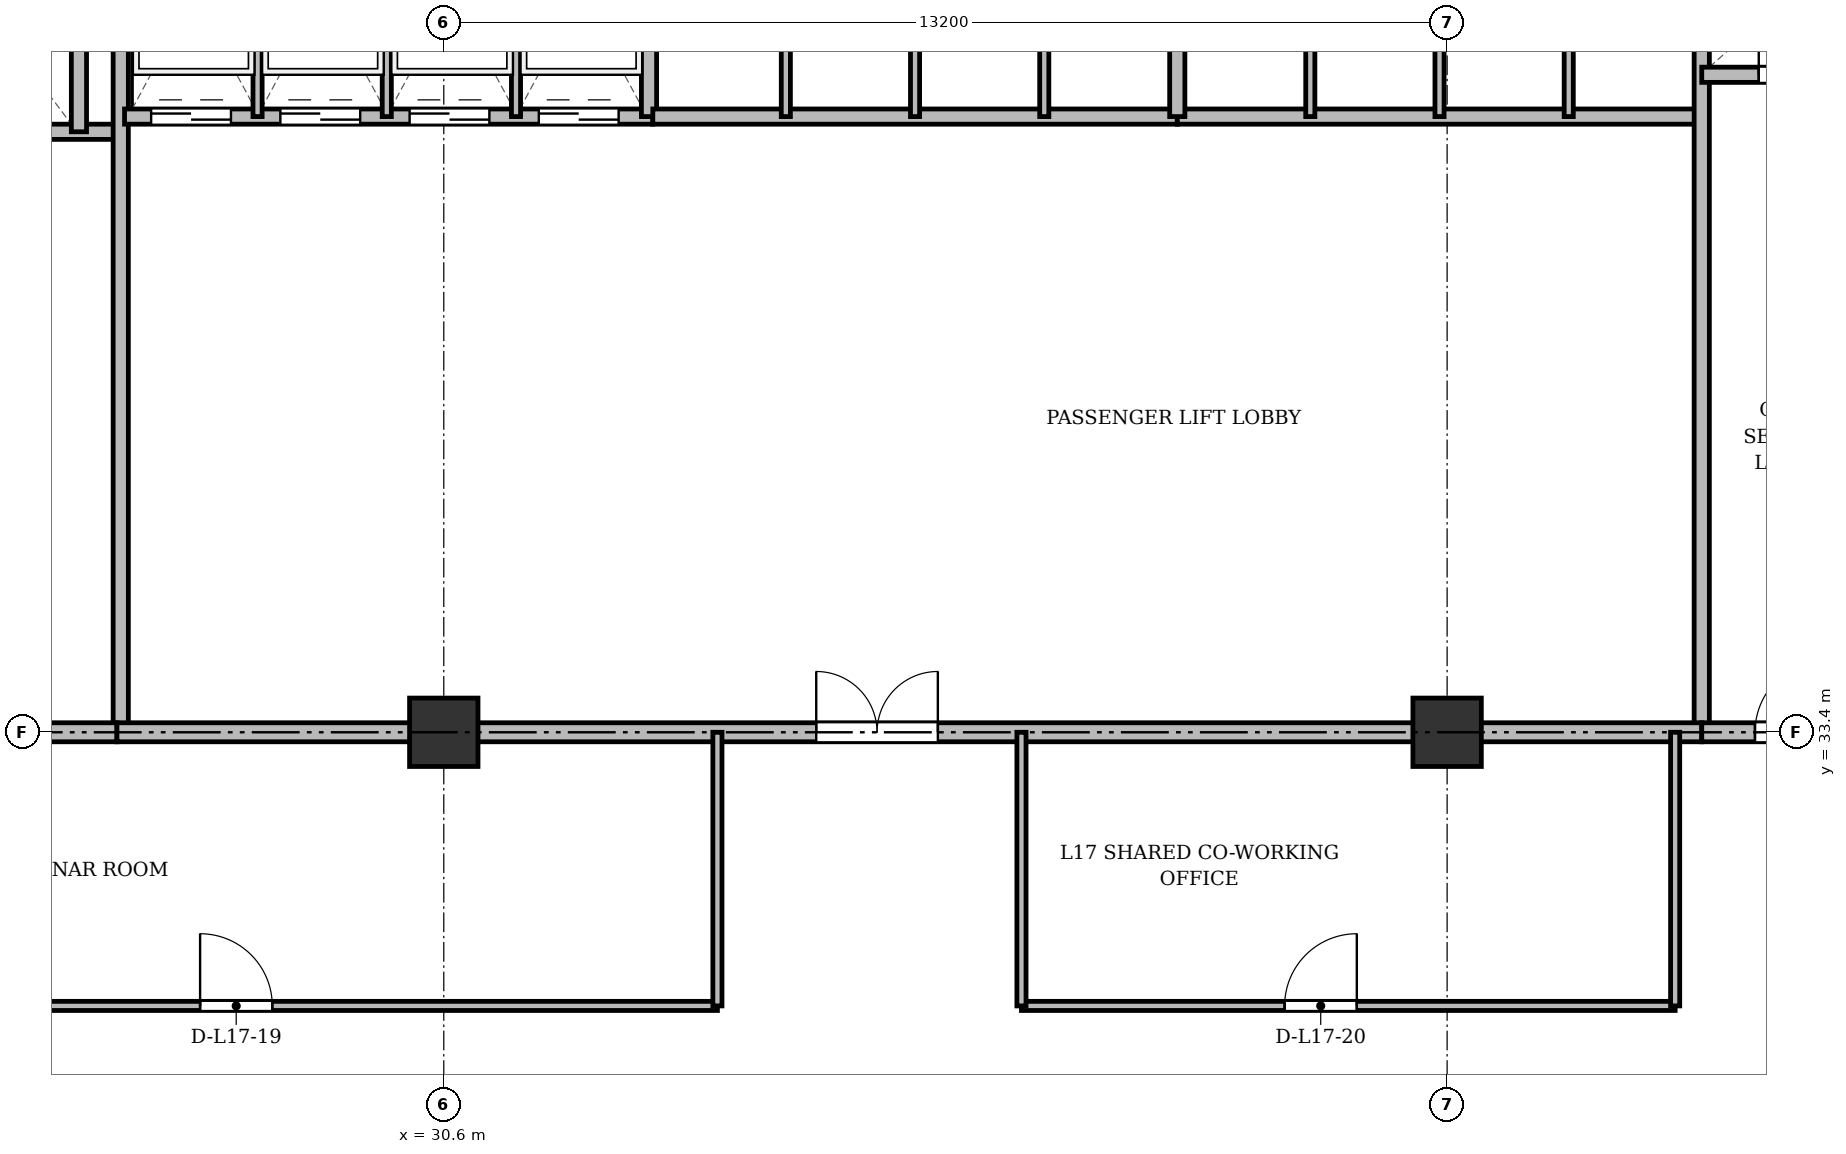
"""IFC4 building model, lengths in metres.
Left out: names, types, materials, properties, quantities, classifications, styles, units other than length and angle.
Written with IfcOpenShell. Run it as: python <this file> out.ifc"""

import sys

from ifc_helpers import new_model, si_unit, direction, frame, frame_2d, origin, origin_2d, place, context, subcontext, project, spatial, rectangle, extrude, source, transform, mapped, element, fill, save


model = new_model("IFC4")
c1 = context("Model", 3, precision=1e-05, world=origin(), true_north=direction((0.0, 1.0)))
c2 = subcontext(c1, "Body", "Model", "MODEL_VIEW")
j1 = project(units=[si_unit("LENGTHUNIT", "METRE"), si_unit("PLANEANGLEUNIT", "RADIAN")], contexts=[c1])
p1 = place(None, origin())
s1 = spatial("IfcSite", under=j1, at=p1, CompositionType="ELEMENT")
p2 = place(p1, origin())
s2 = spatial("IfcBuilding", under=s1, at=p2, CompositionType="ELEMENT")
p3 = place(p2, frame((0.0, 0.0, 66.7)))
s3 = spatial("IfcBuildingStorey", under=s2, at=p3, CompositionType="ELEMENT", Elevation=66.7)
m1 = source(origin(), c2, "Body", "SweptSolid", [
    extrude(rectangle(XDim=0.9, YDim=0.9, at=origin_2d()), origin(), (0.0, 0.0, 1.0), 3.6),
])
for number, where, z_axis, x_axis in (
    (1, (30.6, 33.4, 0.0), (0.0, 0.0, 1.0), (1.0, 0.0, 0.0)),
    (2, (43.8, 33.4, 0.0), (0.0, 0.0, 1.0), (1.0, 0.0, 0.0)),
):
    element("IfcColumn", number, at=place(p3, frame(where, z_axis=z_axis, x_axis=x_axis)), inside=s3, PredefinedType="COLUMN", context=c2, shape_type="MappedRepresentation", body=[
        mapped(m1, transform((0.0, 0.0, 0.0), x_axis=(1.0, 0.0, 0.0), y_axis=(0.0, 1.0, 0.0), z_axis=(0.0, 0.0, 1.0), scale=1.0)),
    ])
p4 = place(p3, frame((19.55, 41.3, 0.0), z_axis=(0.0, 0.0, 1.0), x_axis=(1.0, 0.0, 0.0)))
e3 = element("IfcWall", 3, at=p4, inside=s3, PredefinedType="SOLIDWALL", context=c2, shape_type="SweptSolid", body=[
    extrude(rectangle(XDim=6.75, YDim=0.2, at=frame_2d((3.375, 0.0))), origin(), (0.0, 0.0, 1.0), 3.34),
])
p5 = place(p4, frame((1.7, 0.0, 0.0)))
e4 = element("IfcOpeningElement", 4, at=p5, cuts=e3, PredefinedType="OPENING", context=c2, shape_type="SweptSolid", body=[
    extrude(rectangle(XDim=1.1, YDim=2.15, at=frame_2d((0.55, 1.075))), frame((0.0, 0.11, 0.0), z_axis=(0.0, -1.0, 0.0), x_axis=(1.0, 0.0, 0.0)), (0.0, 0.0, 1.0), 0.22),
])
p6 = place(p4, frame((4.4, 0.0, 0.0)))
e5 = element("IfcOpeningElement", 5, at=p6, cuts=e3, PredefinedType="OPENING", context=c2, shape_type="SweptSolid", body=[
    extrude(rectangle(XDim=1.1, YDim=2.15, at=frame_2d((0.55, 1.075))), frame((0.0, 0.11, 0.0), z_axis=(0.0, -1.0, 0.0), x_axis=(1.0, 0.0, 0.0)), (0.0, 0.0, 1.0), 0.22),
])
p7 = place(p3, frame((25.8, 41.3, 0.0), z_axis=(0.0, 0.0, 1.0), x_axis=(0.0, 1.0, 0.0)))
e6 = element("IfcWall", 6, at=p7, inside=s3, PredefinedType="SOLIDWALL", context=c2, shape_type="SweptSolid", body=[
    extrude(rectangle(XDim=3.4, YDim=0.2, at=frame_2d((1.7, 0.0))), origin(), (0.0, 0.0, 1.0), 3.34),
])
p8 = place(p3, frame((26.35, 33.4, 0.0), z_axis=(0.0, 0.0, 1.0), x_axis=(0.0, 1.0, 0.0)))
e7 = element("IfcWall", 7, at=p8, inside=s3, PredefinedType="SOLIDWALL", context=c2, shape_type="SweptSolid", body=[
    extrude(rectangle(XDim=11.3, YDim=0.2, at=frame_2d((5.65, 0.0))), origin(), (0.0, 0.0, 1.0), 2.69),
])
p9 = place(p3, frame((19.5, 33.4, 0.0), z_axis=(0.0, 0.0, 1.0), x_axis=(1.0, 0.0, 0.0)))
e8 = element("IfcWall", 8, at=p9, inside=s3, PredefinedType="PARTITIONING", context=c2, shape_type="SweptSolid", body=[
    extrude(rectangle(XDim=6.8, YDim=0.25, at=frame_2d((3.4, 0.0))), origin(), (0.0, 0.0, 1.0), 2.69),
])
p10 = place(p9, frame((0.75, 0.0, 0.0)))
e9 = element("IfcOpeningElement", 9, at=p10, cuts=e8, PredefinedType="OPENING", context=c2, shape_type="SweptSolid", body=[
    extrude(rectangle(XDim=1.6, YDim=2.2, at=frame_2d((0.8, 1.1))), frame((0.0, 0.135, 0.0), z_axis=(0.0, -1.0, 0.0), x_axis=(1.0, 0.0, 0.0)), (0.0, 0.0, 1.0), 0.27),
])
p11 = place(p3, frame((26.4, 41.5, 0.0), z_axis=(0.0, 0.0, 1.0), x_axis=(1.0, 0.0, 0.0)))
e10 = element("IfcWall", 10, at=p11, inside=s3, PredefinedType="SOLIDWALL", context=c2, shape_type="SweptSolid", body=[
    extrude(rectangle(XDim=6.95, YDim=0.2, at=frame_2d((3.475, 0.0))), origin(), (0.0, 0.0, 1.0), 3.34),
])
p12 = place(p11, frame((0.35, 0.0, 0.0)))
e11 = element("IfcOpeningElement", 11, at=p12, cuts=e10, PredefinedType="OPENING", context=c2, shape_type="SweptSolid", body=[
    extrude(rectangle(XDim=1.05, YDim=2.15, at=frame_2d((0.525, 1.075))), frame((0.0, 0.11, 0.0), z_axis=(0.0, -1.0, 0.0), x_axis=(1.0, 0.0, 0.0)), (0.0, 0.0, 1.0), 0.22),
])
p13 = place(p11, frame((2.05, 0.0, 0.0)))
e12 = element("IfcOpeningElement", 12, at=p13, cuts=e10, PredefinedType="OPENING", context=c2, shape_type="SweptSolid", body=[
    extrude(rectangle(XDim=1.05, YDim=2.15, at=frame_2d((0.525, 1.075))), frame((0.0, 0.11, 0.0), z_axis=(0.0, -1.0, 0.0), x_axis=(1.0, 0.0, 0.0)), (0.0, 0.0, 1.0), 0.22),
])
p14 = place(p11, frame((3.75, 0.0, 0.0)))
e13 = element("IfcOpeningElement", 13, at=p14, cuts=e10, PredefinedType="OPENING", context=c2, shape_type="SweptSolid", body=[
    extrude(rectangle(XDim=1.05, YDim=2.15, at=frame_2d((0.525, 1.075))), frame((0.0, 0.11, 0.0), z_axis=(0.0, -1.0, 0.0), x_axis=(1.0, 0.0, 0.0)), (0.0, 0.0, 1.0), 0.22),
])
p15 = place(p11, frame((5.45, 0.0, 0.0)))
e14 = element("IfcOpeningElement", 14, at=p15, cuts=e10, PredefinedType="OPENING", context=c2, shape_type="SweptSolid", body=[
    extrude(rectangle(XDim=1.05, YDim=2.15, at=frame_2d((0.525, 1.075))), frame((0.0, 0.11, 0.0), z_axis=(0.0, -1.0, 0.0), x_axis=(1.0, 0.0, 0.0)), (0.0, 0.0, 1.0), 0.22),
])
p16 = place(p3, frame((33.3, 41.5, 0.0), z_axis=(0.0, 0.0, 1.0), x_axis=(0.0, 1.0, 0.0)))
e15 = element("IfcWall", 15, at=p16, inside=s3, PredefinedType="SOLIDWALL", context=c2, shape_type="SweptSolid", body=[
    extrude(rectangle(XDim=3.2, YDim=0.2, at=frame_2d((1.6, 0.0))), origin(), (0.0, 0.0, 1.0), 3.34),
])
for number, where, z_axis, x_axis in (
    (16, (28.15, 41.5, 0.0), (0.0, 0.0, 1.0), (0.0, 1.0, 0.0)),
    (17, (29.85, 41.5, 0.0), (0.0, 0.0, 1.0), (0.0, 1.0, 0.0)),
    (18, (31.55, 41.5, 0.0), (0.0, 0.0, 1.0), (0.0, 1.0, 0.0)),
):
    element("IfcWall", number, at=place(p3, frame(where, z_axis=z_axis, x_axis=x_axis)), inside=s3, PredefinedType="PARTITIONING", context=c2, shape_type="SweptSolid", body=[
        extrude(rectangle(XDim=3.2, YDim=0.12, at=frame_2d((1.6, 0.0))), origin(), (0.0, 0.0, 1.0), 3.34),
    ])
p17 = place(p3, frame((33.35, 41.5, 0.0), z_axis=(0.0, 0.0, 1.0), x_axis=(1.0, 0.0, 0.0)))
e19 = element("IfcWall", 19, at=p17, inside=s3, PredefinedType="SOLIDWALL", context=c2, shape_type="SweptSolid", body=[
    extrude(rectangle(XDim=6.9, YDim=0.2, at=frame_2d((3.45, 0.0))), origin(), (0.0, 0.0, 1.0), 3.34),
])
for number, where, z_axis, x_axis in (
    (20, (35.1, 41.5, 0.0), (0.0, 0.0, 1.0), (0.0, 1.0, 0.0)),
    (21, (36.8, 41.5, 0.0), (0.0, 0.0, 1.0), (0.0, 1.0, 0.0)),
    (22, (38.5, 41.5, 0.0), (0.0, 0.0, 1.0), (0.0, 1.0, 0.0)),
):
    element("IfcWall", number, at=place(p3, frame(where, z_axis=z_axis, x_axis=x_axis)), inside=s3, PredefinedType="PARTITIONING", context=c2, shape_type="SweptSolid", body=[
        extrude(rectangle(XDim=3.2, YDim=0.12, at=frame_2d((1.6, 0.0))), origin(), (0.0, 0.0, 1.0), 3.34),
    ])
p18 = place(p3, frame((40.25, 41.5, 0.0), z_axis=(0.0, 0.0, 1.0), x_axis=(1.0, 0.0, 0.0)))
e23 = element("IfcWall", 23, at=p18, inside=s3, PredefinedType="SOLIDWALL", context=c2, shape_type="SweptSolid", body=[
    extrude(rectangle(XDim=6.9, YDim=0.2, at=frame_2d((3.45, 0.0))), origin(), (0.0, 0.0, 1.0), 2.752),
])
p19 = place(p3, frame((40.25, 41.5, 0.0), z_axis=(0.0, 0.0, 1.0), x_axis=(0.0, 1.0, 0.0)))
e24 = element("IfcWall", 24, at=p19, inside=s3, PredefinedType="SOLIDWALL", context=c2, shape_type="SweptSolid", body=[
    extrude(rectangle(XDim=3.2, YDim=0.2, at=frame_2d((1.6, 0.0))), origin(), (0.0, 0.0, 1.0), 3.34),
])
p20 = place(p3, frame((42.0, 41.5, 0.0), z_axis=(0.0, 0.0, 1.0), x_axis=(0.0, 1.0, 0.0)))
e25 = element("IfcWall", 25, at=p20, inside=s3, PredefinedType="PARTITIONING", context=c2, shape_type="SweptSolid", body=[
    extrude(rectangle(XDim=3.2, YDim=0.12, at=frame_2d((1.6, 0.0))), origin(), (0.0, 0.0, 1.0), 3.34),
])
p21 = place(p3, frame((43.7, 41.5, 0.0), z_axis=(0.0, 0.0, 1.0), x_axis=(0.0, 1.0, 0.0)))
e26 = element("IfcWall", 26, at=p21, inside=s3, PredefinedType="PARTITIONING", context=c2, shape_type="SweptSolid", body=[
    extrude(rectangle(XDim=3.2, YDim=0.12, at=frame_2d((1.6, 0.0))), origin(), (0.0, 0.0, 1.0), 2.752),
])
p22 = place(p3, frame((45.4, 41.5, 0.0), z_axis=(0.0, 0.0, 1.0), x_axis=(0.0, 1.0, 0.0)))
e27 = element("IfcWall", 27, at=p22, inside=s3, PredefinedType="PARTITIONING", context=c2, shape_type="SweptSolid", body=[
    extrude(rectangle(XDim=3.2, YDim=0.12, at=frame_2d((1.6, 0.0))), origin(), (0.0, 0.0, 1.0), 3.34),
])
p23 = place(p3, frame((47.15, 33.4, 0.0), z_axis=(0.0, 0.0, 1.0), x_axis=(0.0, 1.0, 0.0)))
e28 = element("IfcWall", 28, at=p23, inside=s3, PredefinedType="SOLIDWALL", context=c2, shape_type="SweptSolid", body=[
    extrude(rectangle(XDim=11.3, YDim=0.2, at=frame_2d((5.65, 0.0))), origin(), (0.0, 0.0, 1.0), 2.69),
])
p24 = place(p3, frame((26.3, 33.4, 0.0), z_axis=(0.0, 0.0, 1.0), x_axis=(1.0, 0.0, 0.0)))
e29 = element("IfcWall", 29, at=p24, inside=s3, PredefinedType="PARTITIONING", context=c2, shape_type="SweptSolid", body=[
    extrude(rectangle(XDim=20.85, YDim=0.25, at=frame_2d((10.425, 0.0))), origin(), (0.0, 0.0, 1.0), 2.69),
])
p25 = place(p24, frame((9.2, 0.0, 0.0)))
e30 = element("IfcOpeningElement", 30, at=p25, cuts=e29, PredefinedType="OPENING", context=c2, shape_type="SweptSolid", body=[
    extrude(rectangle(XDim=1.6, YDim=2.2, at=frame_2d((0.8, 1.1))), frame((0.0, 0.135, 0.0), z_axis=(0.0, -1.0, 0.0), x_axis=(1.0, 0.0, 0.0)), (0.0, 0.0, 1.0), 0.27),
])
p26 = place(p3, frame((47.15, 42.05, 0.0), z_axis=(0.0, 0.0, 1.0), x_axis=(1.0, 0.0, 0.0)))
e31 = element("IfcWall", 31, at=p26, inside=s3, PredefinedType="SOLIDWALL", context=c2, shape_type="SweptSolid", body=[
    extrude(rectangle(XDim=7.85, YDim=0.2, at=frame_2d((3.925, 0.0))), origin(), (0.0, 0.0, 1.0), 2.752),
])
p27 = place(p26, frame((0.75, 0.0, 0.0)))
e32 = element("IfcOpeningElement", 32, at=p27, cuts=e31, PredefinedType="OPENING", context=c2, shape_type="SweptSolid", body=[
    extrude(rectangle(XDim=0.9, YDim=2.1, at=frame_2d((0.45, 1.05))), frame((0.0, 0.11, 0.0), z_axis=(0.0, -1.0, 0.0), x_axis=(1.0, 0.0, 0.0)), (0.0, 0.0, 1.0), 0.22),
])
p28 = place(p26, frame((3.85, 0.0, 0.0)))
e33 = element("IfcOpeningElement", 33, at=p28, cuts=e31, PredefinedType="OPENING", context=c2, shape_type="SweptSolid", body=[
    extrude(rectangle(XDim=0.9, YDim=2.1, at=frame_2d((0.45, 1.05))), frame((0.0, 0.11, 0.0), z_axis=(0.0, -1.0, 0.0), x_axis=(1.0, 0.0, 0.0)), (0.0, 0.0, 1.0), 0.22),
])
p29 = place(p3, frame((47.15, 33.4, 0.0), z_axis=(0.0, 0.0, 1.0), x_axis=(1.0, 0.0, 0.0)))
e34 = element("IfcWall", 34, at=p29, inside=s3, PredefinedType="PARTITIONING", context=c2, shape_type="SweptSolid", body=[
    extrude(rectangle(XDim=11.15, YDim=0.25, at=frame_2d((5.575, 0.0))), origin(), (0.0, 0.0, 1.0), 2.69),
])
p30 = place(p29, frame((0.7, 0.0, 0.0)))
e35 = element("IfcOpeningElement", 35, at=p30, cuts=e34, PredefinedType="OPENING", context=c2, shape_type="SweptSolid", body=[
    extrude(rectangle(XDim=0.95, YDim=2.15, at=frame_2d((0.475, 1.075))), frame((0.0, 0.135, 0.0), z_axis=(0.0, -1.0, 0.0), x_axis=(1.0, 0.0, 0.0)), (0.0, 0.0, 1.0), 0.27),
])
p31 = place(p29, frame((6.0, 0.0, 0.0)))
e36 = element("IfcOpeningElement", 36, at=p31, cuts=e34, PredefinedType="OPENING", context=c2, shape_type="SweptSolid", body=[
    extrude(rectangle(XDim=1.2, YDim=2.15, at=frame_2d((0.6, 1.075))), frame((0.0, 0.135, 0.0), z_axis=(0.0, -1.0, 0.0), x_axis=(1.0, 0.0, 0.0)), (0.0, 0.0, 1.0), 0.27),
])
p32 = place(p3, frame((22.45, 29.8, 0.0), z_axis=(0.0, 0.0, 1.0), x_axis=(1.0, 0.0, 0.0)))
e37 = element("IfcWall", 37, at=p32, inside=s3, PredefinedType="PARTITIONING", context=c2, shape_type="SweptSolid", body=[
    extrude(rectangle(XDim=11.75, YDim=0.12, at=frame_2d((5.875, 0.0))), origin(), (0.0, 0.0, 1.0), 2.752),
])
p33 = place(p32, frame((4.944, 0.0, 0.0)))
e38 = element("IfcOpeningElement", 38, at=p33, cuts=e37, PredefinedType="OPENING", context=c2, shape_type="SweptSolid", body=[
    extrude(rectangle(XDim=0.95, YDim=2.15, at=frame_2d((0.475, 1.075))), frame((0.0, 0.07, 0.0), z_axis=(0.0, -1.0, 0.0), x_axis=(1.0, 0.0, 0.0)), (0.0, 0.0, 1.0), 0.14),
])
p34 = place(p3, frame((38.2, 29.8, 0.0), z_axis=(0.0, 0.0, 1.0), x_axis=(1.0, 0.0, 0.0)))
e39 = element("IfcWall", 39, at=p34, inside=s3, PredefinedType="PARTITIONING", context=c2, shape_type="SweptSolid", body=[
    extrude(rectangle(XDim=8.6, YDim=0.12, at=frame_2d((4.3, 0.0))), origin(), (0.0, 0.0, 1.0), 2.752),
])
p35 = place(p34, frame((3.462, 0.0, 0.0)))
e40 = element("IfcOpeningElement", 40, at=p35, cuts=e39, PredefinedType="OPENING", context=c2, shape_type="SweptSolid", body=[
    extrude(rectangle(XDim=0.95, YDim=2.15, at=frame_2d((0.475, 1.075))), frame((0.0, 0.07, 0.0), z_axis=(0.0, -1.0, 0.0), x_axis=(1.0, 0.0, 0.0)), (0.0, 0.0, 1.0), 0.14),
])
for number, where, z_axis, x_axis in (
    (41, (34.2, 29.8, 0.0), (0.0, 0.0, 1.0), (0.0, 1.0, 0.0)),
    (42, (38.2, 29.8, 0.0), (0.0, 0.0, 1.0), (0.0, 1.0, 0.0)),
    (43, (46.8, 29.8, 0.0), (0.0, 0.0, 1.0), (0.0, 1.0, 0.0)),
):
    element("IfcWall", number, at=place(p3, frame(where, z_axis=z_axis, x_axis=x_axis)), inside=s3, PredefinedType="PARTITIONING", context=c2, shape_type="SweptSolid", body=[
        extrude(rectangle(XDim=3.6, YDim=0.12, at=frame_2d((1.8, 0.0))), origin(), (0.0, 0.0, 1.0), 2.69),
    ])
m2 = source(origin(), c2, "Body", "SweptSolid", [
    extrude(rectangle(XDim=1.05, YDim=2.15, at=frame_2d((0.525, 1.075))), frame((0.0, 0.025, 0.0), z_axis=(0.0, -1.0, 0.0), x_axis=(1.0, 0.0, 0.0)), (0.0, 0.0, 1.0), 0.05),
])
p36 = place(p12, origin())
e44 = element("IfcDoor", 44, at=p36, inside=s3, OperationType="DOUBLE_DOOR_SLIDING", PredefinedType="DOOR", context=c2, shape_type="MappedRepresentation", body=[
    mapped(m2, transform((0.0, 0.0, 0.0), x_axis=(1.0, 0.0, 0.0), y_axis=(0.0, 1.0, 0.0), z_axis=(0.0, 0.0, 1.0), scale=1.0)),
])
fill(e11, e44)
p37 = place(p13, origin())
e45 = element("IfcDoor", 45, at=p37, inside=s3, OperationType="DOUBLE_DOOR_SLIDING", PredefinedType="DOOR", context=c2, shape_type="MappedRepresentation", body=[
    mapped(m2, transform((0.0, 0.0, 0.0), x_axis=(1.0, 0.0, 0.0), y_axis=(0.0, 1.0, 0.0), z_axis=(0.0, 0.0, 1.0), scale=1.0)),
])
fill(e12, e45)
p38 = place(p14, origin())
e46 = element("IfcDoor", 46, at=p38, inside=s3, OperationType="DOUBLE_DOOR_SLIDING", PredefinedType="DOOR", context=c2, shape_type="MappedRepresentation", body=[
    mapped(m2, transform((0.0, 0.0, 0.0), x_axis=(1.0, 0.0, 0.0), y_axis=(0.0, 1.0, 0.0), z_axis=(0.0, 0.0, 1.0), scale=1.0)),
])
fill(e13, e46)
p39 = place(p15, origin())
e47 = element("IfcDoor", 47, at=p39, inside=s3, OperationType="DOUBLE_DOOR_SLIDING", PredefinedType="DOOR", context=c2, shape_type="MappedRepresentation", body=[
    mapped(m2, transform((0.0, 0.0, 0.0), x_axis=(1.0, 0.0, 0.0), y_axis=(0.0, 1.0, 0.0), z_axis=(0.0, 0.0, 1.0), scale=1.0)),
])
fill(e14, e47)
m3 = source(origin(), c2, "Body", "SweptSolid", [
    extrude(rectangle(XDim=1.6, YDim=2.2, at=frame_2d((0.8, 1.1))), frame((0.0, 0.025, 0.0), z_axis=(0.0, -1.0, 0.0), x_axis=(1.0, 0.0, 0.0)), (0.0, 0.0, 1.0), 0.05),
])
p40 = place(p25, origin())
e48 = element("IfcDoor", 48, at=p40, inside=s3, OperationType="DOUBLE_DOOR_SINGLE_SWING", PredefinedType="DOOR", context=c2, shape_type="MappedRepresentation", body=[
    mapped(m3, transform((0.0, 0.0, 0.0), x_axis=(1.0, 0.0, 0.0), y_axis=(0.0, 1.0, 0.0), z_axis=(0.0, 0.0, 1.0), scale=1.0)),
])
fill(e30, e48)
m4 = source(origin(), c2, "Body", "SweptSolid", [
    extrude(rectangle(XDim=0.9, YDim=2.1, at=frame_2d((0.45, 1.05))), frame((0.0, 0.025, 0.0), z_axis=(0.0, -1.0, 0.0), x_axis=(1.0, 0.0, 0.0)), (0.0, 0.0, 1.0), 0.05),
])
p41 = place(p27, origin())
e49 = element("IfcDoor", 49, at=p41, inside=s3, OperationType="SINGLE_SWING_LEFT", PredefinedType="DOOR", context=c2, shape_type="MappedRepresentation", body=[
    mapped(m4, transform((0.0, 0.0, 0.0), x_axis=(1.0, 0.0, 0.0), y_axis=(0.0, 1.0, 0.0), z_axis=(0.0, 0.0, 1.0), scale=1.0)),
])
fill(e32, e49)
m5 = source(origin(), c2, "Body", "SweptSolid", [
    extrude(rectangle(XDim=0.95, YDim=2.15, at=frame_2d((0.475, 1.075))), frame((0.0, 0.025, 0.0), z_axis=(0.0, -1.0, 0.0), x_axis=(1.0, 0.0, 0.0)), (0.0, 0.0, 1.0), 0.05),
])
p42 = place(p30, origin())
e50 = element("IfcDoor", 50, at=p42, inside=s3, OperationType="SINGLE_SWING_RIGHT", PredefinedType="DOOR", context=c2, shape_type="MappedRepresentation", body=[
    mapped(m5, transform((0.0, 0.0, 0.0), x_axis=(1.0, 0.0, 0.0), y_axis=(0.0, 1.0, 0.0), z_axis=(0.0, 0.0, 1.0), scale=1.0)),
])
fill(e35, e50)
p43 = place(p33, origin())
e51 = element("IfcDoor", 51, at=p43, inside=s3, OperationType="SINGLE_SWING_LEFT", PredefinedType="DOOR", context=c2, shape_type="MappedRepresentation", body=[
    mapped(m5, transform((0.0, 0.0, 0.0), x_axis=(1.0, 0.0, 0.0), y_axis=(0.0, 1.0, 0.0), z_axis=(0.0, 0.0, 1.0), scale=1.0)),
])
fill(e38, e51)
p44 = place(p35, origin())
e52 = element("IfcDoor", 52, at=p44, inside=s3, OperationType="SINGLE_SWING_RIGHT", PredefinedType="DOOR", context=c2, shape_type="MappedRepresentation", body=[
    mapped(m5, transform((0.0, 0.0, 0.0), x_axis=(1.0, 0.0, 0.0), y_axis=(0.0, 1.0, 0.0), z_axis=(0.0, 0.0, 1.0), scale=1.0)),
])
fill(e40, e52)
save(model, sys.argv[1])
